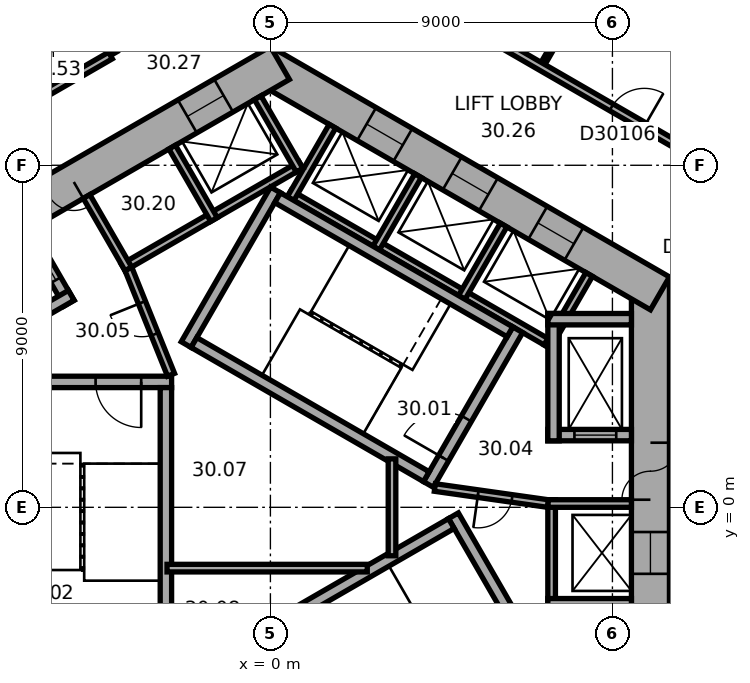
"""IFC4 building model, lengths in metres.
Left out: names, types, materials, properties, quantities, classifications, styles, units other than length and angle.
Written with IfcOpenShell. Run it as: python <this file> out.ifc"""

import sys

from ifc_helpers import new_model, si_unit, direction, frame, frame_2d, origin, place, context, subcontext, project, spatial, rectangle, extrude, element, fill, save


model = new_model("IFC4")
c1 = context("Model", 3, precision=1e-05, world=origin(), true_north=direction((0.0, 1.0)))
c2 = subcontext(c1, "Body", "Model", "MODEL_VIEW")
j1 = project(units=[si_unit("LENGTHUNIT", "METRE"), si_unit("PLANEANGLEUNIT", "RADIAN")], contexts=[c1])
p1 = place(None, origin())
s1 = spatial("IfcSite", under=j1, at=p1, CompositionType="ELEMENT")
p2 = place(p1, origin())
s2 = spatial("IfcBuilding", under=s1, at=p2, CompositionType="ELEMENT")
p3 = place(p2, frame((0.0, 0.0, 124.4)))
s3 = spatial("IfcBuildingStorey", under=s2, at=p3, CompositionType="ELEMENT", Elevation=124.4)
p4 = place(p3, frame((10.0, -6.062, 0.0), z_axis=(0.0, 0.0, 1.0), x_axis=(0.0, 1.0, 0.0)))
e1 = element("IfcWall", 1, at=p4, inside=s3, PredefinedType="SHEAR", context=c2, shape_type="SweptSolid", body=[
    extrude(rectangle(XDim=12.125, YDim=1.0, at=frame_2d((6.062, 0.0))), origin(), (0.0, 0.0, 1.0), 3.7),
])
p5 = place(p4, frame((6.262, 0.0, 0.0)))
e2 = element("IfcOpeningElement", 2, at=p5, cuts=e1, PredefinedType="OPENING", context=c2, shape_type="SweptSolid", body=[
    extrude(rectangle(XDim=1.5, YDim=2.1, at=frame_2d((0.75, 1.05))), frame((0.0, 0.51, 0.0), z_axis=(0.0, -1.0, 0.0), x_axis=(1.0, 0.0, 0.0)), (0.0, 0.0, 1.0), 1.02),
])
p6 = place(p4, frame((1.712, 0.0, 0.0)))
e3 = element("IfcOpeningElement", 3, at=p6, cuts=e1, PredefinedType="OPENING", context=c2, shape_type="SweptSolid", body=[
    extrude(rectangle(XDim=1.1, YDim=2.1, at=frame_2d((0.55, 1.05))), frame((0.0, 0.51, 0.0), z_axis=(0.0, -1.0, 0.0), x_axis=(1.0, 0.0, 0.0)), (0.0, 0.0, 1.0), 1.02),
])
p7 = place(p4, frame((4.312, 0.0, 0.0)))
e4 = element("IfcOpeningElement", 4, at=p7, cuts=e1, PredefinedType="OPENING", context=c2, shape_type="SweptSolid", body=[
    extrude(rectangle(XDim=1.1, YDim=2.1, at=frame_2d((0.55, 1.05))), frame((0.0, 0.51, 0.0), z_axis=(0.0, -1.0, 0.0), x_axis=(1.0, 0.0, 0.0)), (0.0, 0.0, 1.0), 1.02),
])
p8 = place(p3, frame((10.25, 5.629, 0.0), z_axis=(0.0, 0.0, 1.0), x_axis=(-0.866022616891, 0.50000482701, 0.0)))
e5 = element("IfcWall", 5, at=p8, inside=s3, PredefinedType="SHEAR", context=c2, shape_type="SweptSolid", body=[
    extrude(rectangle(XDim=12.125, YDim=1.0, at=frame_2d((6.062, 0.0))), origin(), (0.0, 0.0, 1.0), 3.7),
])
p9 = place(p8, frame((2.612, 0.0, 0.0)))
e6 = element("IfcOpeningElement", 6, at=p9, cuts=e5, PredefinedType="OPENING", context=c2, shape_type="SweptSolid", body=[
    extrude(rectangle(XDim=1.1, YDim=2.1, at=frame_2d((0.55, 1.05))), frame((0.0, 0.51, 0.0), z_axis=(0.0, -1.0, 0.0), x_axis=(1.0, 0.0, 0.0)), (0.0, 0.0, 1.0), 1.02),
])
p10 = place(p8, frame((5.212, 0.0, 0.0)))
e7 = element("IfcOpeningElement", 7, at=p10, cuts=e5, PredefinedType="OPENING", context=c2, shape_type="SweptSolid", body=[
    extrude(rectangle(XDim=1.1, YDim=2.1, at=frame_2d((0.55, 1.05))), frame((0.0, 0.51, 0.0), z_axis=(0.0, -1.0, 0.0), x_axis=(1.0, 0.0, 0.0)), (0.0, 0.0, 1.0), 1.02),
])
p11 = place(p8, frame((7.812, 0.0, 0.0)))
e8 = element("IfcOpeningElement", 8, at=p11, cuts=e5, PredefinedType="OPENING", context=c2, shape_type="SweptSolid", body=[
    extrude(rectangle(XDim=1.1, YDim=2.1, at=frame_2d((0.55, 1.05))), frame((0.0, 0.51, 0.0), z_axis=(0.0, -1.0, 0.0), x_axis=(1.0, 0.0, 0.0)), (0.0, 0.0, 1.0), 1.02),
])
p12 = place(p3, frame((0.25, 11.691, 0.0), z_axis=(0.0, 0.0, 1.0), x_axis=(-0.866022616891, -0.50000482701, 0.0)))
e9 = element("IfcWall", 9, at=p12, inside=s3, PredefinedType="SHEAR", context=c2, shape_type="SweptSolid", body=[
    extrude(rectangle(XDim=12.125, YDim=1.0, at=frame_2d((6.062, 0.0))), origin(), (0.0, 0.0, 1.0), 3.7),
])
p13 = place(p12, frame((6.262, 0.0, 0.0)))
e10 = element("IfcOpeningElement", 10, at=p13, cuts=e9, PredefinedType="OPENING", context=c2, shape_type="SweptSolid", body=[
    extrude(rectangle(XDim=1.5, YDim=2.1, at=frame_2d((0.75, 1.05))), frame((0.0, 0.51, 0.0), z_axis=(0.0, -1.0, 0.0), x_axis=(1.0, 0.0, 0.0)), (0.0, 0.0, 1.0), 1.02),
])
p14 = place(p12, frame((1.712, 0.0, 0.0)))
e11 = element("IfcOpeningElement", 11, at=p14, cuts=e9, PredefinedType="OPENING", context=c2, shape_type="SweptSolid", body=[
    extrude(rectangle(XDim=1.1, YDim=2.1, at=frame_2d((0.55, 1.05))), frame((0.0, 0.51, 0.0), z_axis=(0.0, -1.0, 0.0), x_axis=(1.0, 0.0, 0.0)), (0.0, 0.0, 1.0), 1.02),
])
p15 = place(p3, frame((7.4, -5.2, 0.0), z_axis=(0.0, 0.0, 1.0), x_axis=(0.0, 1.0, 0.0)))
e12 = element("IfcWall", 12, at=p15, inside=s3, PredefinedType="PARTITIONING", context=c2, shape_type="SweptSolid", body=[
    extrude(rectangle(XDim=5.4, YDim=0.2, at=frame_2d((2.7, 0.0))), origin(), (0.0, 0.0, 1.0), 3.42),
])
for number, where, z_axis, x_axis in (
    (13, (7.3, -2.5, 0.0), (0.0, 0.0, 1.0), (1.0, 0.0, 0.0)),
    (14, (7.3, 0.1, 0.0), (0.0, 0.0, 1.0), (1.0, 0.0, 0.0)),
):
    element("IfcWall", number, at=place(p3, frame(where, z_axis=z_axis, x_axis=x_axis)), inside=s3, PredefinedType="PARTITIONING", context=c2, shape_type="SweptSolid", body=[
        extrude(rectangle(XDim=2.2, YDim=0.2, at=frame_2d((1.1, 0.0))), origin(), (0.0, 0.0, 1.0), 3.42),
    ])
p16 = place(p3, frame((7.424, 4.259, 0.0), z_axis=(0.0, 0.0, 1.0), x_axis=(-0.866026010844, 0.49999894854, 0.0)))
e15 = element("IfcWall", 15, at=p16, inside=s3, PredefinedType="PARTITIONING", context=c2, shape_type="SweptSolid", body=[
    extrude(rectangle(XDim=8.0, YDim=0.2, at=frame_2d((4.0, 0.0))), origin(), (0.0, 0.0, 1.0), 3.42),
])
for number, where, z_axis, x_axis in (
    (16, (7.287, 4.222, 0.0), (0.0, 0.0, 1.0), (0.5, 0.866, 0.0)),
    (17, (5.036, 5.522, 0.0), (0.0, 0.0, 1.0), (0.5, 0.866, 0.0)),
    (18, (2.784, 6.822, 0.0), (0.0, 0.0, 1.0), (0.5, 0.866, 0.0)),
    (19, (0.532, 8.122, 0.0), (0.0, 0.0, 1.0), (0.5, 0.866, 0.0)),
):
    element("IfcWall", number, at=place(p3, frame(where, z_axis=z_axis, x_axis=x_axis)), inside=s3, PredefinedType="PARTITIONING", context=c2, shape_type="SweptSolid", body=[
        extrude(rectangle(XDim=2.2, YDim=0.2, at=frame_2d((1.1, 0.0))), origin(), (0.0, 0.0, 1.0), 3.42),
    ])
p17 = place(p3, frame((0.803, 9.009, 0.0), z_axis=(0.0, 0.0, 1.0), x_axis=(-0.866028230842, -0.499995103361, 0.0)))
e20 = element("IfcWall", 20, at=p17, inside=s3, PredefinedType="PARTITIONING", context=c2, shape_type="SweptSolid", body=[
    extrude(rectangle(XDim=5.4, YDim=0.2, at=frame_2d((2.7, 0.0))), origin(), (0.0, 0.0, 1.0), 3.42),
])
p18 = place(p3, frame((0.767, 8.872, 0.0), z_axis=(0.0, 0.0, 1.0), x_axis=(-0.499994660107, 0.866028486751, 0.0)))
e21 = element("IfcWall", 21, at=p18, inside=s3, PredefinedType="PARTITIONING", context=c2, shape_type="SweptSolid", body=[
    extrude(rectangle(XDim=2.2, YDim=0.2, at=frame_2d((1.1, 0.0))), origin(), (0.0, 0.0, 1.0), 3.42),
])
for number, where, z_axis, x_axis in (
    (22, (-1.485, 7.572, 0.0), (0.0, 0.0, 1.0), (-0.5, 0.866, 0.0)),
    (23, (-3.737, 6.272, 0.0), (0.0, 0.0, 1.0), (-0.5, 0.866, 0.0)),
):
    element("IfcWall", number, at=place(p3, frame(where, z_axis=z_axis, x_axis=x_axis)), inside=s3, PredefinedType="PARTITIONING", context=c2, shape_type="SweptSolid", body=[
        extrude(rectangle(XDim=2.2, YDim=0.2, at=frame_2d((1.1, 0.0))), origin(), (0.0, 0.0, 1.0), 3.42),
    ])
p19 = place(p3, frame((4.158, 0.602, 0.0), z_axis=(0.0, 0.0, 1.0), x_axis=(0.499977259774, 0.866038532462, 0.0)))
e24 = element("IfcWall", 24, at=p19, inside=s3, PredefinedType="SHEAR", context=c2, shape_type="SweptSolid", body=[
    extrude(rectangle(XDim=4.7, YDim=0.3, at=frame_2d((2.35, 0.0))), origin(), (0.0, 0.0, 1.0), 3.42),
])
p20 = place(p19, frame((0.8, 0.0, 0.0)))
e25 = element("IfcOpeningElement", 25, at=p20, cuts=e24, PredefinedType="OPENING", context=c2, shape_type="SweptSolid", body=[
    extrude(rectangle(XDim=1.2, YDim=2.1, at=frame_2d((0.6, 1.05))), frame((0.0, 0.16, 0.0), z_axis=(0.0, -1.0, 0.0), x_axis=(1.0, 0.0, 0.0)), (0.0, 0.0, 1.0), 0.32),
])
p21 = place(p3, frame((-2.216, 4.282, 0.0), z_axis=(0.0, 0.0, 1.0), x_axis=(0.499977259774, 0.866038532462, 0.0)))
e26 = element("IfcWall", 26, at=p21, inside=s3, PredefinedType="SHEAR", context=c2, shape_type="SweptSolid", body=[
    extrude(rectangle(XDim=4.7, YDim=0.3, at=frame_2d((2.35, 0.0))), origin(), (0.0, 0.0, 1.0), 3.42),
])
for number, where, z_axis, x_axis in (
    (27, (4.103, 0.807, 0.0), (0.0, 0.0, 1.0), (-0.866, 0.5, 0.0)),
    (28, (6.303, 4.617, 0.0), (0.0, 0.0, 1.0), (-0.866, 0.5, 0.0)),
):
    element("IfcWall", number, at=place(p3, frame(where, z_axis=z_axis, x_axis=x_axis)), inside=s3, PredefinedType="SHEAR", context=c2, shape_type="SweptSolid", body=[
        extrude(rectangle(XDim=7.06, YDim=0.3, at=frame_2d((3.53, 0.0))), origin(), (0.0, 0.0, 1.0), 3.42),
    ])
p22 = place(p3, frame((-2.6, 3.3, 0.0), z_axis=(0.0, 0.0, 1.0), x_axis=(-1.0, 0.0, 0.0)))
e29 = element("IfcWall", 29, at=p22, inside=s3, PredefinedType="SHEAR", context=c2, shape_type="SweptSolid", body=[
    extrude(rectangle(XDim=4.7, YDim=0.3, at=frame_2d((2.35, 0.0))), origin(), (0.0, 0.0, 1.0), 3.42),
])
p23 = place(p22, frame((0.8, 0.0, 0.0)))
e30 = element("IfcOpeningElement", 30, at=p23, cuts=e29, PredefinedType="OPENING", context=c2, shape_type="SweptSolid", body=[
    extrude(rectangle(XDim=1.2, YDim=2.1, at=frame_2d((0.6, 1.05))), frame((0.0, 0.16, 0.0), z_axis=(0.0, -1.0, 0.0), x_axis=(1.0, 0.0, 0.0)), (0.0, 0.0, 1.0), 0.32),
])
p24 = place(p3, frame((-2.75, 3.15, 0.0), z_axis=(0.0, 0.0, 1.0), x_axis=(0.0, -1.0, 0.0)))
e31 = element("IfcWall", 31, at=p24, inside=s3, PredefinedType="SHEAR", context=c2, shape_type="SweptSolid", body=[
    extrude(rectangle(XDim=7.06, YDim=0.3, at=frame_2d((3.53, 0.0))), origin(), (0.0, 0.0, 1.0), 3.42),
])
p25 = place(p3, frame((4.816, -0.222, 0.0), z_axis=(0.0, 0.0, 1.0), x_axis=(0.499977259774, -0.866038532462, 0.0)))
e32 = element("IfcWall", 32, at=p25, inside=s3, PredefinedType="SHEAR", context=c2, shape_type="SweptSolid", body=[
    extrude(rectangle(XDim=4.7, YDim=0.3, at=frame_2d((2.35, 0.0))), origin(), (0.0, 0.0, 1.0), 3.42),
])
p26 = place(p3, frame((-1.353, -3.957, 0.0), z_axis=(0.0, 0.0, 1.0), x_axis=(0.866027801685, 0.499995846692, 0.0)))
e33 = element("IfcWall", 33, at=p26, inside=s3, PredefinedType="SHEAR", context=c2, shape_type="SweptSolid", body=[
    extrude(rectangle(XDim=7.06, YDim=0.3, at=frame_2d((3.53, 0.0))), origin(), (0.0, 0.0, 1.0), 3.42),
])
p27 = place(p3, frame((7.3, 1.9, 0.0), z_axis=(0.0, 0.0, 1.0), x_axis=(1.0, 0.0, 0.0)))
e34 = element("IfcWall", 34, at=p27, inside=s3, PredefinedType="SHEAR", context=c2, shape_type="SweptSolid", body=[
    extrude(rectangle(XDim=2.2, YDim=0.3, at=frame_2d((1.1, 0.0))), origin(), (0.0, 0.0, 1.0), 3.42),
])
p28 = place(p27, frame((0.7, 0.0, 0.0)))
e35 = element("IfcOpeningElement", 35, at=p28, cuts=e34, PredefinedType="OPENING", context=c2, shape_type="SweptSolid", body=[
    extrude(rectangle(XDim=1.1, YDim=2.1, at=frame_2d((0.55, 1.05))), frame((0.0, 0.16, 0.0), z_axis=(0.0, -1.0, 0.0), x_axis=(1.0, 0.0, 0.0)), (0.0, 0.0, 1.0), 0.32),
])
p29 = place(p3, frame((7.45, 1.75, 0.0), z_axis=(0.0, 0.0, 1.0), x_axis=(0.0, 1.0, 0.0)))
e36 = element("IfcWall", 36, at=p29, inside=s3, PredefinedType="SHEAR", context=c2, shape_type="SweptSolid", body=[
    extrude(rectangle(XDim=3.35, YDim=0.3, at=frame_2d((1.675, 0.0))), origin(), (0.0, 0.0, 1.0), 3.42),
])
p30 = place(p3, frame((7.3, 4.95, 0.0), z_axis=(0.0, 0.0, 1.0), x_axis=(1.0, 0.0, 0.0)))
e37 = element("IfcWall", 37, at=p30, inside=s3, PredefinedType="SHEAR", context=c2, shape_type="SweptSolid", body=[
    extrude(rectangle(XDim=2.2, YDim=0.3, at=frame_2d((1.1, 0.0))), origin(), (0.0, 0.0, 1.0), 3.42),
])
p31 = place(p3, frame((4.327, 0.521, 0.0), z_axis=(0.0, 0.0, 1.0), x_axis=(0.990124376366, -0.14019172346, 0.0)))
e38 = element("IfcWall", 38, at=p31, inside=s3, PredefinedType="PARTITIONING", context=c2, shape_type="SweptSolid", body=[
    extrude(rectangle(XDim=3.002, YDim=0.2, at=frame_2d((1.501, 0.0))), origin(), (0.0, 0.0, 1.0), 3.42),
])
p32 = place(p31, frame((1.15, 0.0, 0.0)))
e39 = element("IfcOpeningElement", 39, at=p32, cuts=e38, PredefinedType="OPENING", context=c2, shape_type="SweptSolid", body=[
    extrude(rectangle(XDim=0.9, YDim=2.1, at=frame_2d((0.45, 1.05))), frame((0.0, 0.11, 0.0), z_axis=(0.0, -1.0, 0.0), x_axis=(1.0, 0.0, 0.0)), (0.0, 0.0, 1.0), 0.22),
])
p33 = place(p3, frame((-5.295, 5.372, 0.0), z_axis=(0.0, 0.0, 1.0), x_axis=(-0.500077893725, 0.86598042715, 0.0)))
e40 = element("IfcWall", 40, at=p33, inside=s3, PredefinedType="SHEAR", context=c2, shape_type="SweptSolid", body=[
    extrude(rectangle(XDim=2.2, YDim=0.3, at=frame_2d((1.1, 0.0))), origin(), (0.0, 0.0, 1.0), 3.42),
])
p34 = place(p33, frame((0.7, 0.0, 0.0)))
e41 = element("IfcOpeningElement", 41, at=p34, cuts=e40, PredefinedType="OPENING", context=c2, shape_type="SweptSolid", body=[
    extrude(rectangle(XDim=1.1, YDim=2.1, at=frame_2d((0.55, 1.05))), frame((0.0, 0.16, 0.0), z_axis=(0.0, -1.0, 0.0), x_axis=(1.0, 0.0, 0.0)), (0.0, 0.0, 1.0), 0.32),
])
p35 = place(p3, frame((-5.24, 5.577, 0.0), z_axis=(0.0, 0.0, 1.0), x_axis=(-0.866014461049, -0.500018952895, 0.0)))
e42 = element("IfcWall", 42, at=p35, inside=s3, PredefinedType="SHEAR", context=c2, shape_type="SweptSolid", body=[
    extrude(rectangle(XDim=3.35, YDim=0.3, at=frame_2d((1.675, 0.0))), origin(), (0.0, 0.0, 1.0), 3.42),
])
p36 = place(p3, frame((-2.615, 3.487, 0.0), z_axis=(0.0, 0.0, 1.0), x_axis=(-0.373576831041, 0.92759924068, 0.0)))
e43 = element("IfcWall", 43, at=p36, inside=s3, PredefinedType="PARTITIONING", context=c2, shape_type="SweptSolid", body=[
    extrude(rectangle(XDim=3.002, YDim=0.2, at=frame_2d((1.501, 0.0))), origin(), (0.0, 0.0, 1.0), 3.42),
])
p37 = place(p36, frame((1.15, 0.0, 0.0)))
e44 = element("IfcOpeningElement", 44, at=p37, cuts=e43, PredefinedType="OPENING", context=c2, shape_type="SweptSolid", body=[
    extrude(rectangle(XDim=0.9, YDim=2.1, at=frame_2d((0.45, 1.05))), frame((0.0, 0.11, 0.0), z_axis=(0.0, -1.0, 0.0), x_axis=(1.0, 0.0, 0.0)), (0.0, 0.0, 1.0), 0.22),
])
p38 = place(p3, frame((-2.72, -1.6, 0.0), z_axis=(0.0, 0.0, 1.0), x_axis=(1.0, 0.0, 0.0)))
e45 = element("IfcWall", 45, at=p38, inside=s3, PredefinedType="PARTITIONING", context=c2, shape_type="SweptSolid", body=[
    extrude(rectangle(XDim=5.269, YDim=0.2, at=frame_2d((2.634, 0.0))), origin(), (0.0, 0.0, 1.0), 3.42),
])
p39 = place(p3, frame((3.2, -1.275, 0.0), z_axis=(0.0, 0.0, 1.0), x_axis=(0.0, 1.0, 0.0)))
e46 = element("IfcWall", 46, at=p39, inside=s3, PredefinedType="PARTITIONING", context=c2, shape_type="SweptSolid", body=[
    extrude(rectangle(XDim=2.549, YDim=0.2, at=frame_2d((1.275, 0.0))), origin(), (0.0, 0.0, 1.0), 3.42),
])
p40 = place(p3, frame((-4.723, 12.978, 0.0), z_axis=(0.0, 0.0, 1.0), x_axis=(0.500074377092, -0.865982457891, 0.0)))
e47 = element("IfcWall", 47, at=p40, inside=s3, PredefinedType="PARTITIONING", context=c2, shape_type="SweptSolid", body=[
    extrude(rectangle(XDim=1.201, YDim=0.2, at=frame_2d((0.601, 0.0))), origin(), (0.0, 0.0, 1.0), 3.42),
])
p41 = place(p3, frame((-4.209, 11.888, 0.0), z_axis=(0.0, 0.0, 1.0), x_axis=(-0.866020930448, -0.500007747966, 0.0)))
e48 = element("IfcWall", 48, at=p41, inside=s3, PredefinedType="PARTITIONING", context=c2, shape_type="SweptSolid", body=[
    extrude(rectangle(XDim=8.321, YDim=0.2, at=frame_2d((4.161, 0.0))), origin(), (0.0, 0.0, 1.0), 3.42),
])
p42 = place(p41, frame((3.031, 0.0, 0.0)))
e49 = element("IfcOpeningElement", 49, at=p42, cuts=e48, PredefinedType="OPENING", context=c2, shape_type="SweptSolid", body=[
    extrude(rectangle(XDim=1.0, YDim=2.1, at=frame_2d((0.5, 1.05))), frame((0.0, 0.11, 0.0), z_axis=(0.0, -1.0, 0.0), x_axis=(1.0, 0.0, 0.0)), (0.0, 0.0, 1.0), 0.22),
])
p43 = place(p3, frame((8.394, 13.792, 0.0), z_axis=(0.0, 0.0, 1.0), x_axis=(-0.500002508028, -0.866023955769, 0.0)))
e50 = element("IfcWall", 50, at=p43, inside=s3, PredefinedType="PARTITIONING", context=c2, shape_type="SweptSolid", body=[
    extrude(rectangle(XDim=2.44, YDim=0.12, at=frame_2d((1.22, 0.0))), origin(), (0.0, 0.0, 1.0), 3.42),
])
p44 = place(p43, frame((0.77, 0.0, 0.0)))
e51 = element("IfcOpeningElement", 51, at=p44, cuts=e50, PredefinedType="OPENING", context=c2, shape_type="SweptSolid", body=[
    extrude(rectangle(XDim=0.9, YDim=2.1, at=frame_2d((0.45, 1.05))), frame((0.0, 0.07, 0.0), z_axis=(0.0, -1.0, 0.0), x_axis=(1.0, 0.0, 0.0)), (0.0, 0.0, 1.0), 0.14),
])
p45 = place(p3, frame((11.646, 8.981, 0.0), z_axis=(0.0, 0.0, 1.0), x_axis=(-0.866027142779, 0.499996987961, 0.0)))
e52 = element("IfcWall", 52, at=p45, inside=s3, PredefinedType="PARTITIONING", context=c2, shape_type="SweptSolid", body=[
    extrude(rectangle(XDim=9.597, YDim=0.2, at=frame_2d((4.798, 0.0))), origin(), (0.0, 0.0, 1.0), 3.42),
])
p46 = place(p45, frame((2.086, 0.0, 0.0)))
e53 = element("IfcOpeningElement", 53, at=p46, cuts=e52, PredefinedType="OPENING", context=c2, shape_type="SweptSolid", body=[
    extrude(rectangle(XDim=1.0, YDim=2.1, at=frame_2d((0.5, 1.05))), frame((0.0, 0.11, 0.0), z_axis=(0.0, -1.0, 0.0), x_axis=(1.0, 0.0, 0.0)), (0.0, 0.0, 1.0), 0.22),
])
p47 = place(p45, frame((8.01, 0.0, 0.0)))
e54 = element("IfcOpeningElement", 54, at=p47, cuts=e52, PredefinedType="OPENING", context=c2, shape_type="SweptSolid", body=[
    extrude(rectangle(XDim=1.0, YDim=2.1, at=frame_2d((0.5, 1.05))), frame((0.0, 0.11, 0.0), z_axis=(0.0, -1.0, 0.0), x_axis=(1.0, 0.0, 0.0)), (0.0, 0.0, 1.0), 0.22),
])
p48 = place(p5, origin())
e55 = element("IfcDoor", 55, at=p48, inside=s3, OperationType="DOUBLE_DOOR_SINGLE_SWING", PredefinedType="DOOR", context=c2, shape_type="SweptSolid", body=[
    extrude(rectangle(XDim=1.5, YDim=2.1, at=frame_2d((0.75, 1.05))), frame((0.0, 0.025, 0.0), z_axis=(0.0, -1.0, 0.0), x_axis=(1.0, 0.0, 0.0)), (0.0, 0.0, 1.0), 0.05),
])
fill(e2, e55)
p49 = place(p13, origin())
e56 = element("IfcDoor", 56, at=p49, inside=s3, OperationType="DOUBLE_DOOR_SINGLE_SWING", PredefinedType="DOOR", context=c2, shape_type="SweptSolid", body=[
    extrude(rectangle(XDim=1.5, YDim=2.1, at=frame_2d((0.75, 1.05))), frame((0.0, 0.025, 0.0), z_axis=(0.0, -1.0, 0.0), x_axis=(1.0, 0.0, 0.0)), (0.0, 0.0, 1.0), 0.05),
])
fill(e10, e56)
p50 = place(p20, origin())
e57 = element("IfcDoor", 57, at=p50, inside=s3, OperationType="SINGLE_SWING_RIGHT", PredefinedType="DOOR", context=c2, shape_type="SweptSolid", body=[
    extrude(rectangle(XDim=1.2, YDim=2.1, at=frame_2d((0.6, 1.05))), frame((0.0, 0.025, 0.0), z_axis=(0.0, -1.0, 0.0), x_axis=(1.0, 0.0, 0.0)), (0.0, 0.0, 1.0), 0.05),
])
fill(e25, e57)
p51 = place(p23, origin())
e58 = element("IfcDoor", 58, at=p51, inside=s3, OperationType="SINGLE_SWING_RIGHT", PredefinedType="DOOR", context=c2, shape_type="SweptSolid", body=[
    extrude(rectangle(XDim=1.2, YDim=2.1, at=frame_2d((0.6, 1.05))), frame((0.0, 0.025, 0.0), z_axis=(0.0, -1.0, 0.0), x_axis=(1.0, 0.0, 0.0)), (0.0, 0.0, 1.0), 0.05),
])
fill(e30, e58)
p52 = place(p32, origin())
e59 = element("IfcDoor", 59, at=p52, inside=s3, OperationType="SINGLE_SWING_LEFT", PredefinedType="DOOR", context=c2, shape_type="SweptSolid", body=[
    extrude(rectangle(XDim=0.9, YDim=2.1, at=frame_2d((0.45, 1.05))), frame((0.0, 0.025, 0.0), z_axis=(0.0, -1.0, 0.0), x_axis=(1.0, 0.0, 0.0)), (0.0, 0.0, 1.0), 0.05),
])
fill(e39, e59)
p53 = place(p37, origin())
e60 = element("IfcDoor", 60, at=p53, inside=s3, OperationType="SINGLE_SWING_LEFT", PredefinedType="DOOR", context=c2, shape_type="SweptSolid", body=[
    extrude(rectangle(XDim=0.9, YDim=2.1, at=frame_2d((0.45, 1.05))), frame((0.0, 0.025, 0.0), z_axis=(0.0, -1.0, 0.0), x_axis=(1.0, 0.0, 0.0)), (0.0, 0.0, 1.0), 0.05),
])
fill(e44, e60)
p54 = place(p28, origin())
e61 = element("IfcDoor", 61, at=p54, inside=s3, OperationType="DOUBLE_DOOR_SLIDING", PredefinedType="DOOR", context=c2, shape_type="SweptSolid", body=[
    extrude(rectangle(XDim=1.1, YDim=2.1, at=frame_2d((0.55, 1.05))), frame((0.0, 0.025, 0.0), z_axis=(0.0, -1.0, 0.0), x_axis=(1.0, 0.0, 0.0)), (0.0, 0.0, 1.0), 0.05),
])
fill(e35, e61)
p55 = place(p34, origin())
e62 = element("IfcDoor", 62, at=p55, inside=s3, OperationType="DOUBLE_DOOR_SLIDING", PredefinedType="DOOR", context=c2, shape_type="SweptSolid", body=[
    extrude(rectangle(XDim=1.1, YDim=2.1, at=frame_2d((0.55, 1.05))), frame((0.0, 0.025, 0.0), z_axis=(0.0, -1.0, 0.0), x_axis=(1.0, 0.0, 0.0)), (0.0, 0.0, 1.0), 0.05),
])
fill(e41, e62)
p56 = place(p7, origin())
e63 = element("IfcDoor", 63, at=p56, inside=s3, OperationType="DOUBLE_DOOR_SLIDING", PredefinedType="DOOR", context=c2, shape_type="SweptSolid", body=[
    extrude(rectangle(XDim=1.1, YDim=2.1, at=frame_2d((0.55, 1.05))), frame((0.0, 0.025, 0.0), z_axis=(0.0, -1.0, 0.0), x_axis=(1.0, 0.0, 0.0)), (0.0, 0.0, 1.0), 0.05),
])
fill(e4, e63)
p57 = place(p9, origin())
e64 = element("IfcDoor", 64, at=p57, inside=s3, OperationType="DOUBLE_DOOR_SLIDING", PredefinedType="DOOR", context=c2, shape_type="SweptSolid", body=[
    extrude(rectangle(XDim=1.1, YDim=2.1, at=frame_2d((0.55, 1.05))), frame((0.0, 0.025, 0.0), z_axis=(0.0, -1.0, 0.0), x_axis=(1.0, 0.0, 0.0)), (0.0, 0.0, 1.0), 0.05),
])
fill(e6, e64)
p58 = place(p10, origin())
e65 = element("IfcDoor", 65, at=p58, inside=s3, OperationType="DOUBLE_DOOR_SLIDING", PredefinedType="DOOR", context=c2, shape_type="SweptSolid", body=[
    extrude(rectangle(XDim=1.1, YDim=2.1, at=frame_2d((0.55, 1.05))), frame((0.0, 0.025, 0.0), z_axis=(0.0, -1.0, 0.0), x_axis=(1.0, 0.0, 0.0)), (0.0, 0.0, 1.0), 0.05),
])
fill(e7, e65)
p59 = place(p11, origin())
e66 = element("IfcDoor", 66, at=p59, inside=s3, OperationType="DOUBLE_DOOR_SLIDING", PredefinedType="DOOR", context=c2, shape_type="SweptSolid", body=[
    extrude(rectangle(XDim=1.1, YDim=2.1, at=frame_2d((0.55, 1.05))), frame((0.0, 0.025, 0.0), z_axis=(0.0, -1.0, 0.0), x_axis=(1.0, 0.0, 0.0)), (0.0, 0.0, 1.0), 0.05),
])
fill(e8, e66)
p60 = place(p14, origin())
e67 = element("IfcDoor", 67, at=p60, inside=s3, OperationType="DOUBLE_DOOR_SLIDING", PredefinedType="DOOR", context=c2, shape_type="SweptSolid", body=[
    extrude(rectangle(XDim=1.1, YDim=2.1, at=frame_2d((0.55, 1.05))), frame((0.0, 0.025, 0.0), z_axis=(0.0, -1.0, 0.0), x_axis=(1.0, 0.0, 0.0)), (0.0, 0.0, 1.0), 0.05),
])
fill(e11, e67)
p61 = place(p46, origin())
e68 = element("IfcDoor", 68, at=p61, inside=s3, OperationType="SINGLE_SWING_LEFT", PredefinedType="DOOR", context=c2, shape_type="SweptSolid", body=[
    extrude(rectangle(XDim=1.0, YDim=2.1, at=frame_2d((0.5, 1.05))), frame((0.0, 0.025, 0.0), z_axis=(0.0, -1.0, 0.0), x_axis=(1.0, 0.0, 0.0)), (0.0, 0.0, 1.0), 0.05),
])
fill(e53, e68)
save(model, sys.argv[1])
